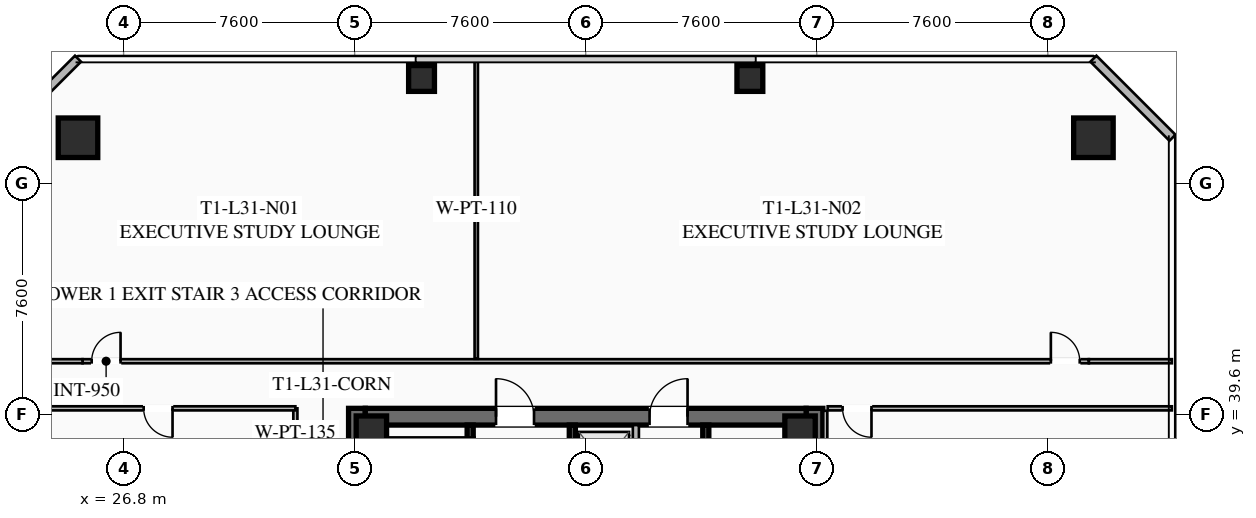
"""IFC4 building model, lengths in metres.
Left out: names, types, materials, properties, quantities, classifications, styles, units other than length and angle.
Written with IfcOpenShell. Run it as: python <this file> out.ifc"""

import sys

from ifc_helpers import new_model, si_unit, direction, frame, frame_2d, origin, origin_2d, place, context, subcontext, project, spatial, rectangle, hollow_rectangle, extrude, element, fill, save


model = new_model("IFC4")
c1 = context("Model", 3, precision=1e-05, world=origin(), true_north=direction((0.0, 1.0)))
c2 = subcontext(c1, "Body", "Model", "MODEL_VIEW")
j1 = project(units=[si_unit("LENGTHUNIT", "METRE"), si_unit("PLANEANGLEUNIT", "RADIAN")], contexts=[c1])
p1 = place(None, origin())
s1 = spatial("IfcSite", under=j1, at=p1, CompositionType="ELEMENT")
p2 = place(p1, origin())
s2 = spatial("IfcBuilding", under=s1, at=p2, CompositionType="ELEMENT")
p3 = place(p2, frame((0.0, 0.0, 117.95)))
s3 = spatial("IfcBuildingStorey", under=s2, at=p3, CompositionType="ELEMENT", Elevation=117.95)
for number, where, z_axis, x_axis in (
    (1, (34.475, 24.2, 0.0), (0.0, 0.0, 1.0), (0.0, 1.0, 0.0)),
    (2, (49.525, 39.8, 0.0), (0.0, 0.0, 1.0), (0.0, -1.0, 0.0)),
):
    element("IfcWall", number, at=place(p3, frame(where, z_axis=z_axis, x_axis=x_axis)), inside=s3, PredefinedType="SHEAR", context=c2, shape_type="SweptSolid", body=[
        extrude(rectangle(XDim=15.6, YDim=0.55, at=frame_2d((7.8, 0.0))), origin(), (0.0, 0.0, 1.0), 3.55),
    ])
p4 = place(p3, frame((34.75, 39.525, 0.0), z_axis=(0.0, 0.0, 1.0), x_axis=(1.0, 0.0, 0.0)))
e3 = element("IfcWall", 3, at=p4, inside=s3, PredefinedType="SHEAR", context=c2, shape_type="SweptSolid", body=[
    extrude(rectangle(XDim=14.5, YDim=0.55, at=frame_2d((7.25, 0.0))), origin(), (0.0, 0.0, 1.0), 3.55),
])
p5 = place(p4, frame((4.3, 0.0, 0.0)))
e4 = element("IfcOpeningElement", 4, at=p5, cuts=e3, PredefinedType="OPENING", context=c2, shape_type="SweptSolid", body=[
    extrude(rectangle(XDim=1.25, YDim=2.25, at=frame_2d((0.625, 1.125))), frame((0.0, 0.285, 0.0), z_axis=(0.0, -1.0, 0.0), x_axis=(1.0, 0.0, 0.0)), (0.0, 0.0, 1.0), 0.57),
])
p6 = place(p4, frame((9.35, 0.0, 0.0)))
e5 = element("IfcOpeningElement", 5, at=p6, cuts=e3, PredefinedType="OPENING", context=c2, shape_type="SweptSolid", body=[
    extrude(rectangle(XDim=1.25, YDim=2.25, at=frame_2d((0.625, 1.125))), frame((0.0, 0.285, 0.0), z_axis=(0.0, -1.0, 0.0), x_axis=(1.0, 0.0, 0.0)), (0.0, 0.0, 1.0), 0.57),
])
for number, where, z_axis, x_axis in (
    (6, (49.05, 39.05, 0.0), (0.0, 0.0, 1.0), (1.0, 0.0, 0.0)),
    (7, (34.95, 39.05, 0.0), (0.0, 0.0, 1.0), (1.0, 0.0, 0.0)),
):
    element("IfcColumn", number, at=place(p3, frame(where, z_axis=z_axis, x_axis=x_axis)), inside=s3, PredefinedType="COLUMN", context=c2, shape_type="SweptSolid", body=[
        extrude(hollow_rectangle(XDim=1.0, YDim=1.0, WallThickness=0.04, at=origin_2d()), origin(), (0.0, 0.0, 1.0), 3.37),
    ])
for number, where, z_axis, x_axis in (
    (8, (58.7, 48.7, 0.0), (0.0, 0.0, 1.0), (1.0, 0.0, 0.0)),
    (9, (25.3, 48.7, 0.0), (0.0, 0.0, 1.0), (1.0, 0.0, 0.0)),
):
    element("IfcColumn", number, at=place(p3, frame(where, z_axis=z_axis, x_axis=x_axis)), inside=s3, PredefinedType="COLUMN", context=c2, shape_type="SweptSolid", body=[
        extrude(hollow_rectangle(XDim=1.3, YDim=1.3, WallThickness=0.05, at=origin_2d()), origin(), (0.0, 0.0, 1.0), 3.37),
    ])
for number, where, z_axis, x_axis in (
    (10, (47.4, 50.65, 0.0), (0.0, 0.0, 1.0), (1.0, 0.0, 0.0)),
    (11, (36.6, 50.65, 0.0), (0.0, 0.0, 1.0), (1.0, 0.0, 0.0)),
):
    element("IfcColumn", number, at=place(p3, frame(where, z_axis=z_axis, x_axis=x_axis)), inside=s3, PredefinedType="COLUMN", context=c2, shape_type="SweptSolid", body=[
        extrude(hollow_rectangle(XDim=0.85, YDim=0.85, WallThickness=0.035, at=origin_2d()), origin(), (0.0, 0.0, 1.0), 3.37),
    ])
for number, where, z_axis, x_axis in (
    (12, (22.7, 48.7, 0.0), (0.0, 0.0, 1.0), (0.707, 0.707, 0.0)),
    (13, (58.7, 51.3, 0.0), (0.0, 0.0, 1.0), (0.707, -0.707, 0.0)),
):
    element("IfcWall", number, at=place(p3, frame(where, z_axis=z_axis, x_axis=x_axis)), inside=s3, PredefinedType="SOLIDWALL", context=c2, shape_type="SweptSolid", body=[
        extrude(rectangle(XDim=3.677, YDim=0.28, at=frame_2d((1.838, 0.0))), origin(), (0.0, 0.0, 1.0), 3.37),
    ])
p7 = place(p3, frame((38.2, 31.2, 0.0), z_axis=(0.0, 0.0, 1.0), x_axis=(0.0, 1.0, 0.0)))
e14 = element("IfcWall", 14, at=p7, inside=s3, PredefinedType="SHEAR", context=c2, shape_type="SweptSolid", body=[
    extrude(rectangle(XDim=8.05, YDim=0.2, at=frame_2d((4.025, 0.0))), origin(), (0.0, 0.0, 1.0), 3.37),
])
p8 = place(p7, frame((0.45, 0.0, 0.0)))
e15 = element("IfcOpeningElement", 15, at=p8, cuts=e14, PredefinedType="OPENING", context=c2, shape_type="SweptSolid", body=[
    extrude(rectangle(XDim=1.15, YDim=2.2, at=frame_2d((0.575, 1.1))), frame((0.0, 0.11, 0.0), z_axis=(0.0, -1.0, 0.0), x_axis=(1.0, 0.0, 0.0)), (0.0, 0.0, 1.0), 0.22),
])
p9 = place(p3, frame((41.56, 24.75, 0.0), z_axis=(0.0, 0.0, 1.0), x_axis=(0.0, 1.0, 0.0)))
e16 = element("IfcWall", 16, at=p9, inside=s3, PredefinedType="SHEAR", context=c2, shape_type="SweptSolid", body=[
    extrude(rectangle(XDim=14.5, YDim=0.2, at=frame_2d((7.25, 0.0))), origin(), (0.0, 0.0, 1.0), 3.37),
])
p10 = place(p3, frame((45.95, 39.25, 0.0), z_axis=(0.0, 0.0, 1.0), x_axis=(0.0, -1.0, 0.0)))
e17 = element("IfcWall", 17, at=p10, inside=s3, PredefinedType="SHEAR", context=c2, shape_type="SweptSolid", body=[
    extrude(rectangle(XDim=6.45, YDim=0.2, at=frame_2d((3.225, 0.0))), origin(), (0.0, 0.0, 1.0), 3.37),
])
p11 = place(p3, frame((43.65, 32.35, 0.0), z_axis=(0.0, 0.0, 1.0), x_axis=(0.0, 1.0, 0.0)))
e18 = element("IfcWall", 18, at=p11, inside=s3, PredefinedType="SOLIDWALL", context=c2, shape_type="SweptSolid", body=[
    extrude(rectangle(XDim=6.9, YDim=0.2, at=frame_2d((3.45, 0.0))), origin(), (0.0, 0.0, 1.0), 3.37),
])
p12 = place(p11, frame((0.575, 0.0, 0.0)))
e19 = element("IfcOpeningElement", 19, at=p12, cuts=e18, PredefinedType="OPENING", context=c2, shape_type="SweptSolid", body=[
    extrude(rectangle(XDim=1.1, YDim=2.2, at=frame_2d((0.55, 1.1))), frame((0.0, 0.11, 0.0), z_axis=(0.0, -1.0, 0.0), x_axis=(1.0, 0.0, 0.0)), (0.0, 0.0, 1.0), 0.22),
])
p13 = place(p11, frame((2.825, 0.0, 0.0)))
e20 = element("IfcOpeningElement", 20, at=p13, cuts=e18, PredefinedType="OPENING", context=c2, shape_type="SweptSolid", body=[
    extrude(rectangle(XDim=1.1, YDim=2.2, at=frame_2d((0.55, 1.1))), frame((0.0, 0.11, 0.0), z_axis=(0.0, -1.0, 0.0), x_axis=(1.0, 0.0, 0.0)), (0.0, 0.0, 1.0), 0.22),
])
p14 = place(p11, frame((5.075, 0.0, 0.0)))
e21 = element("IfcOpeningElement", 21, at=p14, cuts=e18, PredefinedType="OPENING", context=c2, shape_type="SweptSolid", body=[
    extrude(rectangle(XDim=1.1, YDim=2.2, at=frame_2d((0.55, 1.1))), frame((0.0, 0.11, 0.0), z_axis=(0.0, -1.0, 0.0), x_axis=(1.0, 0.0, 0.0)), (0.0, 0.0, 1.0), 0.22),
])
p15 = place(p3, frame((32.45, 35.4, 0.0), z_axis=(0.0, 0.0, 1.0), x_axis=(0.0, 1.0, 0.0)))
e22 = element("IfcWall", 22, at=p15, inside=s3, PredefinedType="PARTITIONING", context=c2, shape_type="SweptSolid", body=[
    extrude(rectangle(XDim=4.4, YDim=0.135, at=frame_2d((2.2, 0.0))), origin(), (0.0, 0.0, 1.0), 2.723),
])
p16 = place(p3, frame((25.45, 41.35, 0.0), z_axis=(0.0, 0.0, 1.0), x_axis=(1.0, 0.0, 0.0)))
e23 = element("IfcWall", 23, at=p16, inside=s3, PredefinedType="PARTITIONING", context=c2, shape_type="SweptSolid", body=[
    extrude(rectangle(XDim=33.1, YDim=0.135, at=frame_2d((16.55, 0.0))), origin(), (0.0, 0.0, 1.0), 2.723),
])
p17 = place(p16, frame((0.3, 0.0, 0.0)))
e24 = element("IfcOpeningElement", 24, at=p17, cuts=e23, PredefinedType="OPENING", context=c2, shape_type="SweptSolid", body=[
    extrude(rectangle(XDim=0.95, YDim=2.05, at=frame_2d((0.475, 1.025))), frame((0.0, 0.077, 0.0), z_axis=(0.0, -1.0, 0.0), x_axis=(1.0, 0.0, 0.0)), (0.0, 0.0, 1.0), 0.155),
])
p18 = place(p16, frame((31.85, 0.0, 0.0)))
e25 = element("IfcOpeningElement", 25, at=p18, cuts=e23, PredefinedType="OPENING", context=c2, shape_type="SweptSolid", body=[
    extrude(rectangle(XDim=0.95, YDim=2.05, at=frame_2d((0.475, 1.025))), frame((0.0, 0.077, 0.0), z_axis=(0.0, -1.0, 0.0), x_axis=(1.0, 0.0, 0.0)), (0.0, 0.0, 1.0), 0.155),
])
for number, where, z_axis, x_axis in (
    (26, (22.72, 41.35, 0.0), (0.0, 0.0, 1.0), (1.0, 0.0, 0.0)),
    (27, (58.55, 41.35, 0.0), (0.0, 0.0, 1.0), (1.0, 0.0, 0.0)),
):
    element("IfcWall", number, at=place(p3, frame(where, z_axis=z_axis, x_axis=x_axis)), inside=s3, PredefinedType="PARTITIONING", context=c2, shape_type="SweptSolid", body=[
        extrude(rectangle(XDim=2.73, YDim=0.135, at=frame_2d((1.365, 0.0))), origin(), (0.0, 0.0, 1.0), 2.723),
    ])
p19 = place(p3, frame((38.4, 41.43, 0.0), z_axis=(0.0, 0.0, 1.0), x_axis=(0.0, 1.0, 0.0)))
e28 = element("IfcWall", 28, at=p19, inside=s3, PredefinedType="PARTITIONING", context=c2, shape_type="SweptSolid", body=[
    extrude(rectangle(XDim=9.85, YDim=0.11, at=frame_2d((4.925, 0.0))), origin(), (0.0, 0.0, 1.0), 2.723),
])
p20 = place(p3, frame((49.88, 39.72, 0.0), z_axis=(0.0, 0.0, 1.0), x_axis=(0.0, -1.0, 0.0)))
e29 = element("IfcWall", 29, at=p20, inside=s3, PredefinedType="PARTITIONING", context=c2, shape_type="SweptSolid", body=[
    extrude(rectangle(XDim=15.44, YDim=0.135, at=frame_2d((7.72, 0.0))), origin(), (0.0, 0.0, 1.0), 2.723),
])
p21 = place(p3, frame((61.28, 39.8, 0.0), z_axis=(0.0, 0.0, 1.0), x_axis=(-1.0, 0.0, 0.0)))
e30 = element("IfcWall", 30, at=p21, inside=s3, PredefinedType="PARTITIONING", context=c2, shape_type="SweptSolid", body=[
    extrude(rectangle(XDim=11.32, YDim=0.135, at=frame_2d((5.66, 0.0))), origin(), (0.0, 0.0, 1.0), 2.723),
])
p22 = place(p21, frame((9.88, 0.0, 0.0)))
e31 = element("IfcOpeningElement", 31, at=p22, cuts=e30, PredefinedType="OPENING", context=c2, shape_type="SweptSolid", body=[
    extrude(rectangle(XDim=0.95, YDim=2.05, at=frame_2d((0.475, 1.025))), frame((0.0, 0.077, 0.0), z_axis=(0.0, -1.0, 0.0), x_axis=(1.0, 0.0, 0.0)), (0.0, 0.0, 1.0), 0.155),
])
p23 = place(p3, frame((32.45, 39.8, 0.0), z_axis=(0.0, 0.0, 1.0), x_axis=(-1.0, 0.0, 0.0)))
e32 = element("IfcWall", 32, at=p23, inside=s3, PredefinedType="PARTITIONING", context=c2, shape_type="SweptSolid", body=[
    extrude(rectangle(XDim=9.73, YDim=0.135, at=frame_2d((4.865, 0.0))), origin(), (0.0, 0.0, 1.0), 2.723),
])
p24 = place(p23, frame((4.04, 0.0, 0.0)))
e33 = element("IfcOpeningElement", 33, at=p24, cuts=e32, PredefinedType="OPENING", context=c2, shape_type="SweptSolid", body=[
    extrude(rectangle(XDim=0.95, YDim=2.05, at=frame_2d((0.475, 1.025))), frame((0.0, 0.077, 0.0), z_axis=(0.0, -1.0, 0.0), x_axis=(1.0, 0.0, 0.0)), (0.0, 0.0, 1.0), 0.155),
])
p25 = place(p5, origin())
e34 = element("IfcDoor", 34, at=p25, inside=s3, OperationType="SINGLE_SWING_LEFT", PredefinedType="DOOR", context=c2, shape_type="SweptSolid", body=[
    extrude(rectangle(XDim=1.25, YDim=2.25, at=frame_2d((0.625, 1.125))), frame((0.0, 0.025, 0.0), z_axis=(0.0, -1.0, 0.0), x_axis=(1.0, 0.0, 0.0)), (0.0, 0.0, 1.0), 0.05),
])
fill(e4, e34)
p26 = place(p6, origin())
e35 = element("IfcDoor", 35, at=p26, inside=s3, OperationType="SINGLE_SWING_RIGHT", PredefinedType="DOOR", context=c2, shape_type="SweptSolid", body=[
    extrude(rectangle(XDim=1.25, YDim=2.25, at=frame_2d((0.625, 1.125))), frame((0.0, 0.025, 0.0), z_axis=(0.0, -1.0, 0.0), x_axis=(1.0, 0.0, 0.0)), (0.0, 0.0, 1.0), 0.05),
])
fill(e5, e35)
p27 = place(p17, origin())
e36 = element("IfcDoor", 36, at=p27, inside=s3, OperationType="SINGLE_SWING_RIGHT", PredefinedType="DOOR", context=c2, shape_type="SweptSolid", body=[
    extrude(rectangle(XDim=0.95, YDim=2.05, at=frame_2d((0.475, 1.025))), frame((0.0, 0.025, 0.0), z_axis=(0.0, -1.0, 0.0), x_axis=(1.0, 0.0, 0.0)), (0.0, 0.0, 1.0), 0.05),
])
fill(e24, e36)
p28 = place(p18, origin())
e37 = element("IfcDoor", 37, at=p28, inside=s3, OperationType="SINGLE_SWING_LEFT", PredefinedType="DOOR", context=c2, shape_type="SweptSolid", body=[
    extrude(rectangle(XDim=0.95, YDim=2.05, at=frame_2d((0.475, 1.025))), frame((0.0, 0.025, 0.0), z_axis=(0.0, -1.0, 0.0), x_axis=(1.0, 0.0, 0.0)), (0.0, 0.0, 1.0), 0.05),
])
fill(e25, e37)
p29 = place(p22, origin())
e38 = element("IfcDoor", 38, at=p29, inside=s3, OperationType="SINGLE_SWING_LEFT", PredefinedType="DOOR", context=c2, shape_type="SweptSolid", body=[
    extrude(rectangle(XDim=0.95, YDim=2.05, at=frame_2d((0.475, 1.025))), frame((0.0, 0.025, 0.0), z_axis=(0.0, -1.0, 0.0), x_axis=(1.0, 0.0, 0.0)), (0.0, 0.0, 1.0), 0.05),
])
fill(e31, e38)
p30 = place(p24, origin())
e39 = element("IfcDoor", 39, at=p30, inside=s3, OperationType="SINGLE_SWING_LEFT", PredefinedType="DOOR", context=c2, shape_type="SweptSolid", body=[
    extrude(rectangle(XDim=0.95, YDim=2.05, at=frame_2d((0.475, 1.025))), frame((0.0, 0.025, 0.0), z_axis=(0.0, -1.0, 0.0), x_axis=(1.0, 0.0, 0.0)), (0.0, 0.0, 1.0), 0.05),
])
fill(e33, e39)
save(model, sys.argv[1])
